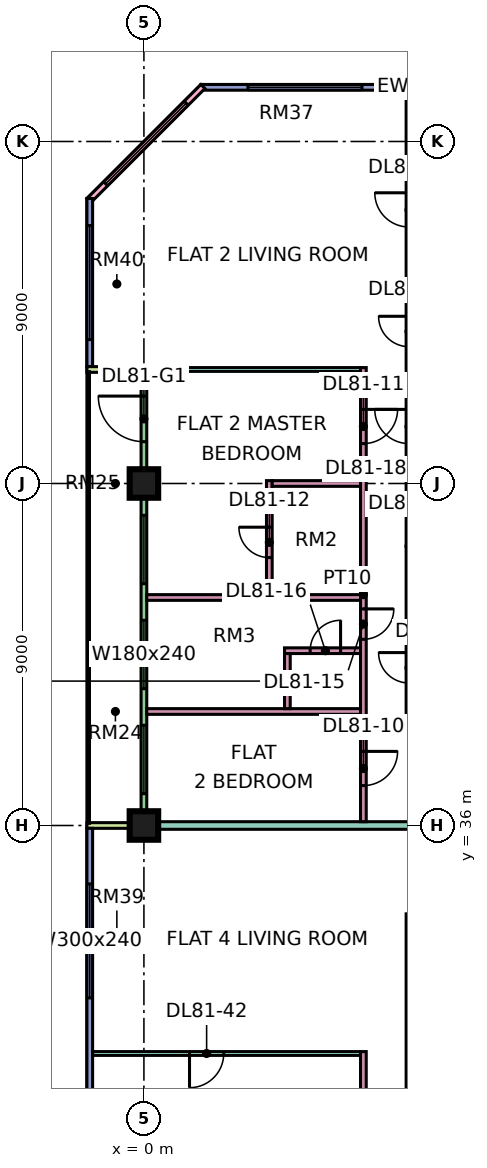
"""IFC4 building model, lengths in metres.
Left out: names, types, materials, properties, quantities, classifications, styles, units other than length and angle.
Written with IfcOpenShell. Run it as: python <this file> out.ifc"""

import sys

from ifc_helpers import new_model, si_unit, direction, frame, frame_2d, origin, origin_2d, place, context, subcontext, project, spatial, rectangle, extrude, element, fill, save


model = new_model("IFC4")
c1 = context("Model", 3, precision=1e-05, world=origin(), true_north=direction((0.0, 1.0)))
c2 = subcontext(c1, "Body", "Model", "MODEL_VIEW")
j1 = project(units=[si_unit("LENGTHUNIT", "METRE"), si_unit("PLANEANGLEUNIT", "RADIAN")], contexts=[c1])
p1 = place(None, origin())
s1 = spatial("IfcSite", under=j1, at=p1, CompositionType="ELEMENT")
p2 = place(p1, origin())
s2 = spatial("IfcBuilding", under=s1, at=p2, CompositionType="ELEMENT")
p3 = place(p2, frame((0.0, 0.0, 350.15)))
s3 = spatial("IfcBuildingStorey", under=s2, at=p3, CompositionType="ELEMENT", Elevation=350.15)
p4 = place(p3, frame((0.0, 36.0, 0.0), z_axis=(0.0, 0.0, 1.0), x_axis=(1.0, 0.0, 0.0)))
e1 = element("IfcColumn", 1, at=p4, inside=s3, PredefinedType="COLUMN", context=c2, shape_type="SweptSolid", body=[
    extrude(rectangle(XDim=0.75, YDim=0.75, at=origin_2d()), origin(), (0.0, 0.0, 1.0), 3.75),
])
p5 = place(p3, frame((0.0, 45.0, 0.0), z_axis=(0.0, 0.0, 1.0), x_axis=(1.0, 0.0, 0.0)))
e2 = element("IfcColumn", 2, at=p5, inside=s3, PredefinedType="COLUMN", context=c2, shape_type="SweptSolid", body=[
    extrude(rectangle(XDim=0.75, YDim=0.75, at=origin_2d()), origin(), (0.0, 0.0, 1.0), 3.75),
])
p6 = place(p3, frame((11.925, 55.425, 0.0), z_axis=(0.0, 0.0, 1.0), x_axis=(-1.0, 0.0, 0.0)))
e3 = element("IfcWall", 3, at=p6, inside=s3, PredefinedType="SOLIDWALL", context=c2, shape_type="SweptSolid", body=[
    extrude(rectangle(XDim=10.425, YDim=0.15, at=frame_2d((5.212, 0.0))), origin(), (0.0, 0.0, 1.0), 3.35),
])
p7 = place(p6, frame((0.975, 0.0, 0.45)))
e4 = element("IfcOpeningElement", 4, at=p7, cuts=e3, PredefinedType="OPENING", context=c2, shape_type="SweptSolid", body=[
    extrude(rectangle(XDim=3.0, YDim=2.4, at=frame_2d((1.5, 1.2))), frame((0.0, 0.085, 0.0), z_axis=(0.0, -1.0, 0.0), x_axis=(1.0, 0.0, 0.0)), (0.0, 0.0, 1.0), 0.17),
])
p8 = place(p6, frame((6.188, 0.0, 0.45)))
e5 = element("IfcOpeningElement", 5, at=p8, cuts=e3, PredefinedType="OPENING", context=c2, shape_type="SweptSolid", body=[
    extrude(rectangle(XDim=3.0, YDim=2.4, at=frame_2d((1.5, 1.2))), frame((0.0, 0.085, 0.0), z_axis=(0.0, -1.0, 0.0), x_axis=(1.0, 0.0, 0.0)), (0.0, 0.0, 1.0), 0.17),
])
p9 = place(p3, frame((1.553, 55.447, 0.0), z_axis=(0.0, 0.0, 1.0), x_axis=(-0.707106781187, -0.707106781187, 0.0)))
e6 = element("IfcWall", 6, at=p9, inside=s3, PredefinedType="SOLIDWALL", context=c2, shape_type="SweptSolid", body=[
    extrude(rectangle(XDim=4.243, YDim=0.15, at=frame_2d((2.121, 0.0))), origin(), (0.0, 0.0, 1.0), 3.35),
])
p10 = place(p9, frame((0.621, 0.0, 0.45)))
e7 = element("IfcOpeningElement", 7, at=p10, cuts=e6, PredefinedType="OPENING", context=c2, shape_type="SweptSolid", body=[
    extrude(rectangle(XDim=3.0, YDim=2.4, at=frame_2d((1.5, 1.2))), frame((0.0, 0.085, 0.0), z_axis=(0.0, -1.0, 0.0), x_axis=(1.0, 0.0, 0.0)), (0.0, 0.0, 1.0), 0.17),
])
p11 = place(p3, frame((-1.425, 52.5, 0.0), z_axis=(0.0, 0.0, 1.0), x_axis=(0.0, -1.0, 0.0)))
e8 = element("IfcWall", 8, at=p11, inside=s3, PredefinedType="SOLIDWALL", context=c2, shape_type="SweptSolid", body=[
    extrude(rectangle(XDim=4.425, YDim=0.15, at=frame_2d((2.212, 0.0))), origin(), (0.0, 0.0, 1.0), 3.35),
])
p12 = place(p11, frame((0.712, 0.0, 0.45)))
e9 = element("IfcOpeningElement", 9, at=p12, cuts=e8, PredefinedType="OPENING", context=c2, shape_type="SweptSolid", body=[
    extrude(rectangle(XDim=3.0, YDim=2.4, at=frame_2d((1.5, 1.2))), frame((0.0, 0.085, 0.0), z_axis=(0.0, -1.0, 0.0), x_axis=(1.0, 0.0, 0.0)), (0.0, 0.0, 1.0), 0.17),
])
p13 = place(p3, frame((0.0, 47.925, 0.0), z_axis=(0.0, 0.0, 1.0), x_axis=(0.0, -1.0, 0.0)))
e10 = element("IfcWall", 10, at=p13, inside=s3, PredefinedType="SOLIDWALL", context=c2, shape_type="SweptSolid", body=[
    extrude(rectangle(XDim=11.85, YDim=0.15, at=frame_2d((5.925, 0.0))), origin(), (0.0, 0.0, 1.0), 3.35),
])
p14 = place(p13, frame((0.625, 0.0, 0.0)))
e11 = element("IfcOpeningElement", 11, at=p14, cuts=e10, PredefinedType="OPENING", context=c2, shape_type="SweptSolid", body=[
    extrude(rectangle(XDim=1.2, YDim=2.4, at=frame_2d((0.6, 1.2))), frame((0.0, 0.085, 0.0), z_axis=(0.0, -1.0, 0.0), x_axis=(1.0, 0.0, 0.0)), (0.0, 0.0, 1.0), 0.17),
])
p15 = place(p13, frame((3.762, 0.0, 0.45)))
e12 = element("IfcOpeningElement", 12, at=p15, cuts=e10, PredefinedType="OPENING", context=c2, shape_type="SweptSolid", body=[
    extrude(rectangle(XDim=1.8, YDim=2.4, at=frame_2d((0.9, 1.2))), frame((0.0, 0.085, 0.0), z_axis=(0.0, -1.0, 0.0), x_axis=(1.0, 0.0, 0.0)), (0.0, 0.0, 1.0), 0.17),
])
p16 = place(p13, frame((6.525, 0.0, 0.45)))
e13 = element("IfcOpeningElement", 13, at=p16, cuts=e10, PredefinedType="OPENING", context=c2, shape_type="SweptSolid", body=[
    extrude(rectangle(XDim=1.8, YDim=2.4, at=frame_2d((0.9, 1.2))), frame((0.0, 0.085, 0.0), z_axis=(0.0, -1.0, 0.0), x_axis=(1.0, 0.0, 0.0)), (0.0, 0.0, 1.0), 0.17),
])
p17 = place(p13, frame((9.288, 0.0, 0.45)))
e14 = element("IfcOpeningElement", 14, at=p17, cuts=e10, PredefinedType="OPENING", context=c2, shape_type="SweptSolid", body=[
    extrude(rectangle(XDim=1.8, YDim=2.4, at=frame_2d((0.9, 1.2))), frame((0.0, 0.085, 0.0), z_axis=(0.0, -1.0, 0.0), x_axis=(1.0, 0.0, 0.0)), (0.0, 0.0, 1.0), 0.17),
])
for number, where, z_axis, x_axis in (
    (15, (-1.5, 48.0, 0.0), (0.0, 0.0, 1.0), (1.0, 0.0, 0.0)),
    (16, (-1.5, 36.0, 0.0), (0.0, 0.0, 1.0), (1.0, 0.0, 0.0)),
):
    element("IfcWall", number, at=place(p3, frame(where, z_axis=z_axis, x_axis=x_axis)), inside=s3, PredefinedType="SOLIDWALL", context=c2, shape_type="SweptSolid", body=[
        extrude(rectangle(XDim=1.5, YDim=0.15, at=frame_2d((0.75, 0.0))), origin(), (0.0, 0.0, 1.0), 3.35),
    ])
p18 = place(p3, frame((-1.425, 35.925, 0.0), z_axis=(0.0, 0.0, 1.0), x_axis=(0.0, -1.0, 0.0)))
e17 = element("IfcWall", 17, at=p18, inside=s3, PredefinedType="SOLIDWALL", context=c2, shape_type="SweptSolid", body=[
    extrude(rectangle(XDim=11.85, YDim=0.15, at=frame_2d((5.925, 0.0))), origin(), (0.0, 0.0, 1.0), 3.35),
])
p19 = place(p18, frame((1.462, 0.0, 0.45)))
e18 = element("IfcOpeningElement", 18, at=p19, cuts=e17, PredefinedType="OPENING", context=c2, shape_type="SweptSolid", body=[
    extrude(rectangle(XDim=3.0, YDim=2.4, at=frame_2d((1.5, 1.2))), frame((0.0, 0.085, 0.0), z_axis=(0.0, -1.0, 0.0), x_axis=(1.0, 0.0, 0.0)), (0.0, 0.0, 1.0), 0.17),
])
p20 = place(p18, frame((7.387, 0.0, 0.45)))
e19 = element("IfcOpeningElement", 19, at=p20, cuts=e17, PredefinedType="OPENING", context=c2, shape_type="SweptSolid", body=[
    extrude(rectangle(XDim=3.0, YDim=2.4, at=frame_2d((1.5, 1.2))), frame((0.0, 0.085, 0.0), z_axis=(0.0, -1.0, 0.0), x_axis=(1.0, 0.0, 0.0)), (0.0, 0.0, 1.0), 0.17),
])
p21 = place(p3, frame((-1.35, 30.0, 0.0), z_axis=(0.0, 0.0, 1.0), x_axis=(1.0, 0.0, 0.0)))
e20 = element("IfcWall", 20, at=p21, inside=s3, PredefinedType="PARTITIONING", context=c2, shape_type="SweptSolid", body=[
    extrude(rectangle(XDim=7.05, YDim=0.1, at=frame_2d((3.525, 0.0))), origin(), (0.0, 0.0, 1.0), 3.35),
])
p22 = place(p21, frame((2.55, 0.0, 0.0)))
e21 = element("IfcOpeningElement", 21, at=p22, cuts=e20, PredefinedType="OPENING", context=c2, shape_type="SweptSolid", body=[
    extrude(rectangle(XDim=0.9, YDim=2.1, at=frame_2d((0.45, 1.05))), frame((0.0, 0.06, 0.0), z_axis=(0.0, -1.0, 0.0), x_axis=(1.0, 0.0, 0.0)), (0.0, 0.0, 1.0), 0.12),
])
e22 = element("IfcWall", 22, at=p4, inside=s3, PredefinedType="PARTITIONING", context=c2, shape_type="SweptSolid", body=[
    extrude(rectangle(XDim=12.275, YDim=0.2, at=frame_2d((6.137, 0.0))), origin(), (0.0, 0.0, 1.0), 3.35),
])
p23 = place(p3, frame((0.0, 48.0, 0.0), z_axis=(0.0, 0.0, 1.0), x_axis=(1.0, 0.0, 0.0)))
e23 = element("IfcWall", 23, at=p23, inside=s3, PredefinedType="PARTITIONING", context=c2, shape_type="SweptSolid", body=[
    extrude(rectangle(XDim=5.7, YDim=0.1, at=frame_2d((2.85, 0.0))), origin(), (0.0, 0.0, 1.0), 3.35),
])
for number, where, z_axis, x_axis in (
    (24, (0.074, 39.0, 0.0), (0.0, 0.0, 1.0), (1.0, 0.0, 0.0)),
    (25, (0.074, 42.0, 0.0), (0.0, 0.0, 1.0), (1.0, 0.0, 0.0)),
):
    element("IfcWall", number, at=place(p3, frame(where, z_axis=z_axis, x_axis=x_axis)), inside=s3, PredefinedType="PARTITIONING", context=c2, shape_type="SweptSolid", body=[
        extrude(rectangle(XDim=5.626, YDim=0.15, at=frame_2d((2.813, 0.0))), origin(), (0.0, 0.0, 1.0), 3.35),
    ])
p24 = place(p3, frame((3.3, 42.075, 0.0), z_axis=(0.0, 0.0, 1.0), x_axis=(0.0, 1.0, 0.0)))
e26 = element("IfcWall", 26, at=p24, inside=s3, PredefinedType="PARTITIONING", context=c2, shape_type="SweptSolid", body=[
    extrude(rectangle(XDim=3.0, YDim=0.15, at=frame_2d((1.5, 0.0))), origin(), (0.0, 0.0, 1.0), 3.35),
])
p25 = place(p24, frame((0.975, 0.0, 0.0)))
e27 = element("IfcOpeningElement", 27, at=p25, cuts=e26, PredefinedType="OPENING", context=c2, shape_type="SweptSolid", body=[
    extrude(rectangle(XDim=0.8, YDim=2.1, at=frame_2d((0.4, 1.05))), frame((0.0, 0.085, 0.0), z_axis=(0.0, -1.0, 0.0), x_axis=(1.0, 0.0, 0.0)), (0.0, 0.0, 1.0), 0.17),
])
p26 = place(p3, frame((3.375, 45.0, 0.0), z_axis=(0.0, 0.0, 1.0), x_axis=(1.0, 0.0, 0.0)))
e28 = element("IfcWall", 28, at=p26, inside=s3, PredefinedType="PARTITIONING", context=c2, shape_type="SweptSolid", body=[
    extrude(rectangle(XDim=2.325, YDim=0.15, at=frame_2d((1.163, 0.0))), origin(), (0.0, 0.0, 1.0), 3.35),
])
p27 = place(p3, frame((3.7, 40.6, 0.0), z_axis=(0.0, 0.0, 1.0), x_axis=(1.0, 0.0, 0.0)))
e29 = element("IfcWall", 29, at=p27, inside=s3, PredefinedType="PARTITIONING", context=c2, shape_type="SweptSolid", body=[
    extrude(rectangle(XDim=2.0, YDim=0.15, at=frame_2d((1.0, 0.0))), origin(), (0.0, 0.0, 1.0), 3.35),
])
p28 = place(p27, frame((0.675, 0.0, 0.0)))
e30 = element("IfcOpeningElement", 30, at=p28, cuts=e29, PredefinedType="OPENING", context=c2, shape_type="SweptSolid", body=[
    extrude(rectangle(XDim=0.8, YDim=2.1, at=frame_2d((0.4, 1.05))), frame((0.0, 0.085, 0.0), z_axis=(0.0, -1.0, 0.0), x_axis=(1.0, 0.0, 0.0)), (0.0, 0.0, 1.0), 0.17),
])
p29 = place(p3, frame((3.775, 39.075, 0.0), z_axis=(0.0, 0.0, 1.0), x_axis=(0.0, 1.0, 0.0)))
e31 = element("IfcWall", 31, at=p29, inside=s3, PredefinedType="PARTITIONING", context=c2, shape_type="SweptSolid", body=[
    extrude(rectangle(XDim=1.45, YDim=0.15, at=frame_2d((0.725, 0.0))), origin(), (0.0, 0.0, 1.0), 3.35),
])
p30 = place(p3, frame((5.775, 22.5, 0.0), z_axis=(0.0, 0.0, 1.0), x_axis=(0.0, 1.0, 0.0)))
e32 = element("IfcWall", 32, at=p30, inside=s3, PredefinedType="PARTITIONING", context=c2, shape_type="SweptSolid", body=[
    extrude(rectangle(XDim=7.55, YDim=0.15, at=frame_2d((3.775, 0.0))), origin(), (0.0, 0.0, 1.0), 3.35),
])
p31 = place(p3, frame((5.775, 36.1, 0.0), z_axis=(0.0, 0.0, 1.0), x_axis=(0.0, 1.0, 0.0)))
e33 = element("IfcWall", 33, at=p31, inside=s3, PredefinedType="PARTITIONING", context=c2, shape_type="SweptSolid", body=[
    extrude(rectangle(XDim=11.95, YDim=0.15, at=frame_2d((5.975, 0.0))), origin(), (0.0, 0.0, 1.0), 3.35),
])
p32 = place(p31, frame((0.95, 0.0, 0.0)))
e34 = element("IfcOpeningElement", 34, at=p32, cuts=e33, PredefinedType="OPENING", context=c2, shape_type="SweptSolid", body=[
    extrude(rectangle(XDim=0.9, YDim=2.1, at=frame_2d((0.45, 1.05))), frame((0.0, 0.085, 0.0), z_axis=(0.0, -1.0, 0.0), x_axis=(1.0, 0.0, 0.0)), (0.0, 0.0, 1.0), 0.17),
])
p33 = place(p31, frame((9.95, 0.0, 0.0)))
e35 = element("IfcOpeningElement", 35, at=p33, cuts=e33, PredefinedType="OPENING", context=c2, shape_type="SweptSolid", body=[
    extrude(rectangle(XDim=0.9, YDim=2.1, at=frame_2d((0.45, 1.05))), frame((0.0, 0.085, 0.0), z_axis=(0.0, -1.0, 0.0), x_axis=(1.0, 0.0, 0.0)), (0.0, 0.0, 1.0), 0.17),
])
p34 = place(p31, frame((4.8, 0.0, 0.0)))
e36 = element("IfcOpeningElement", 36, at=p34, cuts=e33, PredefinedType="OPENING", context=c2, shape_type="SweptSolid", body=[
    extrude(rectangle(XDim=0.8, YDim=2.1, at=frame_2d((0.4, 1.05))), frame((0.0, 0.085, 0.0), z_axis=(0.0, -1.0, 0.0), x_axis=(1.0, 0.0, 0.0)), (0.0, 0.0, 1.0), 0.17),
])
p35 = place(p3, frame((6.975, 22.5, 0.0), z_axis=(0.0, 0.0, 1.0), x_axis=(0.0, 1.0, 0.0)))
e37 = element("IfcWall", 37, at=p35, inside=s3, PredefinedType="PARTITIONING", context=c2, shape_type="SweptSolid", body=[
    extrude(rectangle(XDim=11.175, YDim=0.15, at=frame_2d((5.587, 0.0))), origin(), (0.0, 0.0, 1.0), 3.35),
])
p36 = place(p35, frame((3.05, 0.0, 0.0)))
e38 = element("IfcOpeningElement", 38, at=p36, cuts=e37, PredefinedType="OPENING", context=c2, shape_type="SweptSolid", body=[
    extrude(rectangle(XDim=0.9, YDim=2.1, at=frame_2d((0.45, 1.05))), frame((0.0, 0.085, 0.0), z_axis=(0.0, -1.0, 0.0), x_axis=(1.0, 0.0, 0.0)), (0.0, 0.0, 1.0), 0.17),
])
p37 = place(p3, frame((6.975, 38.925, 0.0), z_axis=(0.0, 0.0, 1.0), x_axis=(0.0, 1.0, 0.0)))
e39 = element("IfcWall", 39, at=p37, inside=s3, PredefinedType="PARTITIONING", context=c2, shape_type="SweptSolid", body=[
    extrude(rectangle(XDim=16.425, YDim=0.15, at=frame_2d((8.212, 0.0))), origin(), (0.0, 0.0, 1.0), 3.35),
])
p38 = place(p37, frame((0.825, 0.0, 0.0)))
e40 = element("IfcOpeningElement", 40, at=p38, cuts=e39, PredefinedType="OPENING", context=c2, shape_type="SweptSolid", body=[
    extrude(rectangle(XDim=0.8, YDim=2.1, at=frame_2d((0.4, 1.05))), frame((0.0, 0.085, 0.0), z_axis=(0.0, -1.0, 0.0), x_axis=(1.0, 0.0, 0.0)), (0.0, 0.0, 1.0), 0.17),
])
p39 = place(p37, frame((12.825, 0.0, 0.0)))
e41 = element("IfcOpeningElement", 41, at=p39, cuts=e39, PredefinedType="OPENING", context=c2, shape_type="SweptSolid", body=[
    extrude(rectangle(XDim=0.9, YDim=2.1, at=frame_2d((0.45, 1.05))), frame((0.0, 0.085, 0.0), z_axis=(0.0, -1.0, 0.0), x_axis=(1.0, 0.0, 0.0)), (0.0, 0.0, 1.0), 0.17),
])
p40 = place(p37, frame((3.975, 0.0, 0.0)))
e42 = element("IfcOpeningElement", 42, at=p40, cuts=e39, PredefinedType="OPENING", context=c2, shape_type="SweptSolid", body=[
    extrude(rectangle(XDim=0.9, YDim=2.1, at=frame_2d((0.45, 1.05))), frame((0.0, 0.085, 0.0), z_axis=(0.0, -1.0, 0.0), x_axis=(1.0, 0.0, 0.0)), (0.0, 0.0, 1.0), 0.17),
])
p41 = place(p37, frame((7.125, 0.0, 0.0)))
e43 = element("IfcOpeningElement", 43, at=p41, cuts=e39, PredefinedType="OPENING", context=c2, shape_type="SweptSolid", body=[
    extrude(rectangle(XDim=0.9, YDim=2.1, at=frame_2d((0.45, 1.05))), frame((0.0, 0.085, 0.0), z_axis=(0.0, -1.0, 0.0), x_axis=(1.0, 0.0, 0.0)), (0.0, 0.0, 1.0), 0.17),
])
p42 = place(p37, frame((9.675, 0.0, 0.0)))
e44 = element("IfcOpeningElement", 44, at=p42, cuts=e39, PredefinedType="OPENING", context=c2, shape_type="SweptSolid", body=[
    extrude(rectangle(XDim=0.8, YDim=2.1, at=frame_2d((0.4, 1.05))), frame((0.0, 0.085, 0.0), z_axis=(0.0, -1.0, 0.0), x_axis=(1.0, 0.0, 0.0)), (0.0, 0.0, 1.0), 0.17),
])
p43 = place(p8, origin())
e45 = element("IfcWindow", 45, at=p43, inside=s3, PartitioningType="SINGLE_PANEL", PredefinedType="WINDOW", context=c2, shape_type="SweptSolid", body=[
    extrude(rectangle(XDim=3.0, YDim=2.4, at=frame_2d((1.5, 1.2))), frame((0.0, 0.03, 0.0), z_axis=(0.0, -1.0, 0.0), x_axis=(1.0, 0.0, 0.0)), (0.0, 0.0, 1.0), 0.06),
])
fill(e5, e45)
p44 = place(p10, origin())
e46 = element("IfcWindow", 46, at=p44, inside=s3, PartitioningType="SINGLE_PANEL", PredefinedType="WINDOW", context=c2, shape_type="SweptSolid", body=[
    extrude(rectangle(XDim=3.0, YDim=2.4, at=frame_2d((1.5, 1.2))), frame((0.0, 0.03, 0.0), z_axis=(0.0, -1.0, 0.0), x_axis=(1.0, 0.0, 0.0)), (0.0, 0.0, 1.0), 0.06),
])
fill(e7, e46)
p45 = place(p12, origin())
e47 = element("IfcWindow", 47, at=p45, inside=s3, PartitioningType="SINGLE_PANEL", PredefinedType="WINDOW", context=c2, shape_type="SweptSolid", body=[
    extrude(rectangle(XDim=3.0, YDim=2.4, at=frame_2d((1.5, 1.2))), frame((0.0, 0.03, 0.0), z_axis=(0.0, -1.0, 0.0), x_axis=(1.0, 0.0, 0.0)), (0.0, 0.0, 1.0), 0.06),
])
fill(e9, e47)
p46 = place(p14, frame((1.2, 0.0, 0.0), z_axis=(0.0, 0.0, 1.0), x_axis=(-1.0, 0.0, 0.0)))
e48 = element("IfcDoor", 48, at=p46, inside=s3, OperationType="DOUBLE_DOOR_SINGLE_SWING", PredefinedType="DOOR", context=c2, shape_type="SweptSolid", body=[
    extrude(rectangle(XDim=1.2, YDim=2.4, at=frame_2d((0.6, 1.2))), frame((0.0, 0.025, 0.0), z_axis=(0.0, -1.0, 0.0), x_axis=(1.0, 0.0, 0.0)), (0.0, 0.0, 1.0), 0.05),
])
fill(e11, e48)
p47 = place(p15, origin())
e49 = element("IfcWindow", 49, at=p47, inside=s3, PartitioningType="SINGLE_PANEL", PredefinedType="WINDOW", context=c2, shape_type="SweptSolid", body=[
    extrude(rectangle(XDim=1.8, YDim=2.4, at=frame_2d((0.9, 1.2))), frame((0.0, 0.03, 0.0), z_axis=(0.0, -1.0, 0.0), x_axis=(1.0, 0.0, 0.0)), (0.0, 0.0, 1.0), 0.06),
])
fill(e12, e49)
p48 = place(p16, origin())
e50 = element("IfcWindow", 50, at=p48, inside=s3, PartitioningType="SINGLE_PANEL", PredefinedType="WINDOW", context=c2, shape_type="SweptSolid", body=[
    extrude(rectangle(XDim=1.8, YDim=2.4, at=frame_2d((0.9, 1.2))), frame((0.0, 0.03, 0.0), z_axis=(0.0, -1.0, 0.0), x_axis=(1.0, 0.0, 0.0)), (0.0, 0.0, 1.0), 0.06),
])
fill(e13, e50)
p49 = place(p17, origin())
e51 = element("IfcWindow", 51, at=p49, inside=s3, PartitioningType="SINGLE_PANEL", PredefinedType="WINDOW", context=c2, shape_type="SweptSolid", body=[
    extrude(rectangle(XDim=1.8, YDim=2.4, at=frame_2d((0.9, 1.2))), frame((0.0, 0.03, 0.0), z_axis=(0.0, -1.0, 0.0), x_axis=(1.0, 0.0, 0.0)), (0.0, 0.0, 1.0), 0.06),
])
fill(e14, e51)
p50 = place(p19, origin())
e52 = element("IfcWindow", 52, at=p50, inside=s3, PartitioningType="SINGLE_PANEL", PredefinedType="WINDOW", context=c2, shape_type="SweptSolid", body=[
    extrude(rectangle(XDim=3.0, YDim=2.4, at=frame_2d((1.5, 1.2))), frame((0.0, 0.03, 0.0), z_axis=(0.0, -1.0, 0.0), x_axis=(1.0, 0.0, 0.0)), (0.0, 0.0, 1.0), 0.06),
])
fill(e18, e52)
p51 = place(p32, origin())
e53 = element("IfcDoor", 53, at=p51, inside=s3, OperationType="SINGLE_SWING_RIGHT", PredefinedType="DOOR", context=c2, shape_type="SweptSolid", body=[
    extrude(rectangle(XDim=0.9, YDim=2.1, at=frame_2d((0.45, 1.05))), frame((0.0, 0.025, 0.0), z_axis=(0.0, -1.0, 0.0), x_axis=(1.0, 0.0, 0.0)), (0.0, 0.0, 1.0), 0.05),
])
fill(e34, e53)
p52 = place(p33, origin())
e54 = element("IfcDoor", 54, at=p52, inside=s3, OperationType="SINGLE_SWING_RIGHT", PredefinedType="DOOR", context=c2, shape_type="SweptSolid", body=[
    extrude(rectangle(XDim=0.9, YDim=2.1, at=frame_2d((0.45, 1.05))), frame((0.0, 0.025, 0.0), z_axis=(0.0, -1.0, 0.0), x_axis=(1.0, 0.0, 0.0)), (0.0, 0.0, 1.0), 0.05),
])
fill(e35, e54)
p53 = place(p25, frame((0.8, 0.0, 0.0), z_axis=(0.0, 0.0, 1.0), x_axis=(-1.0, 0.0, 0.0)))
e55 = element("IfcDoor", 55, at=p53, inside=s3, OperationType="SINGLE_SWING_RIGHT", PredefinedType="DOOR", context=c2, shape_type="SweptSolid", body=[
    extrude(rectangle(XDim=0.8, YDim=2.1, at=frame_2d((0.4, 1.05))), frame((0.0, 0.025, 0.0), z_axis=(0.0, -1.0, 0.0), x_axis=(1.0, 0.0, 0.0)), (0.0, 0.0, 1.0), 0.05),
])
fill(e27, e55)
p54 = place(p34, origin())
e56 = element("IfcDoor", 56, at=p54, inside=s3, OperationType="SINGLE_SWING_RIGHT", PredefinedType="DOOR", context=c2, shape_type="SweptSolid", body=[
    extrude(rectangle(XDim=0.8, YDim=2.1, at=frame_2d((0.4, 1.05))), frame((0.0, 0.025, 0.0), z_axis=(0.0, -1.0, 0.0), x_axis=(1.0, 0.0, 0.0)), (0.0, 0.0, 1.0), 0.05),
])
fill(e36, e56)
p55 = place(p28, frame((0.8, 0.0, 0.0), z_axis=(0.0, 0.0, 1.0), x_axis=(-1.0, 0.0, 0.0)))
e57 = element("IfcDoor", 57, at=p55, inside=s3, OperationType="SINGLE_SWING_RIGHT", PredefinedType="DOOR", context=c2, shape_type="SweptSolid", body=[
    extrude(rectangle(XDim=0.8, YDim=2.1, at=frame_2d((0.4, 1.05))), frame((0.0, 0.025, 0.0), z_axis=(0.0, -1.0, 0.0), x_axis=(1.0, 0.0, 0.0)), (0.0, 0.0, 1.0), 0.05),
])
fill(e30, e57)
p56 = place(p22, frame((0.9, 0.0, 0.0), z_axis=(0.0, 0.0, 1.0), x_axis=(-1.0, 0.0, 0.0)))
e58 = element("IfcDoor", 58, at=p56, inside=s3, OperationType="SINGLE_SWING_LEFT", PredefinedType="DOOR", context=c2, shape_type="SweptSolid", body=[
    extrude(rectangle(XDim=0.9, YDim=2.1, at=frame_2d((0.45, 1.05))), frame((0.0, 0.025, 0.0), z_axis=(0.0, -1.0, 0.0), x_axis=(1.0, 0.0, 0.0)), (0.0, 0.0, 1.0), 0.05),
])
fill(e21, e58)
save(model, sys.argv[1])
